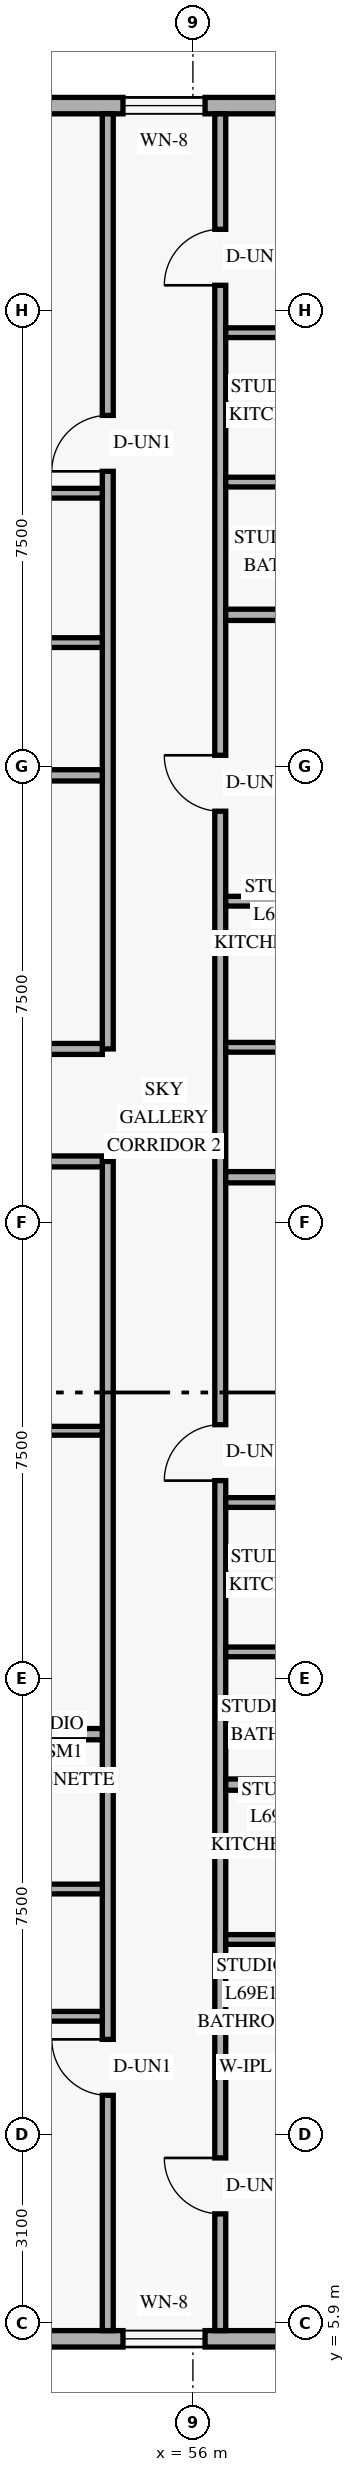
"""IFC4 building model, lengths in metres.
Left out: names, types, materials, properties, quantities, classifications, styles, units other than length and angle.
Written with IfcOpenShell. Run it as: python <this file> out.ifc"""

import sys

from ifc_helpers import new_model, si_unit, direction, frame, frame_2d, origin, place, context, subcontext, project, spatial, rectangle, extrude, element, fill, save


model = new_model("IFC4")
c1 = context("Model", 3, precision=1e-05, world=origin(), true_north=direction((0.0, 1.0)))
c2 = subcontext(c1, "Body", "Model", "MODEL_VIEW")
j1 = project(units=[si_unit("LENGTHUNIT", "METRE"), si_unit("PLANEANGLEUNIT", "RADIAN")], contexts=[c1])
p1 = place(None, origin())
s1 = spatial("IfcSite", under=j1, at=p1, CompositionType="ELEMENT")
p2 = place(p1, origin())
s2 = spatial("IfcBuilding", under=s1, at=p2, CompositionType="ELEMENT")
p3 = place(p2, frame((0.0, 0.0, 264.0)))
s3 = spatial("IfcBuildingStorey", under=s2, at=p3, CompositionType="ELEMENT", Elevation=264.0)
p4 = place(p3, frame((25.82, 5.635, 0.0), z_axis=(0.0, 0.0, 1.0), x_axis=(1.0, 0.0, 0.0)))
e1 = element("IfcWall", 1, at=p4, inside=s3, PredefinedType="SOLIDWALL", context=c2, shape_type="SweptSolid", body=[
    extrude(rectangle(XDim=32.96, YDim=0.27, at=frame_2d((16.48, 0.0))), origin(), (0.0, 0.0, 1.0), 3.36),
])
p5 = place(p4, frame((14.363, 0.0, 0.85)))
e2 = element("IfcOpeningElement", 2, at=p5, cuts=e1, PredefinedType="OPENING", context=c2, shape_type="SweptSolid", body=[
    extrude(rectangle(XDim=1.35, YDim=1.55, at=frame_2d((0.675, 0.775))), frame((0.0, 0.145, 0.0), z_axis=(0.0, -1.0, 0.0), x_axis=(1.0, 0.0, 0.0)), (0.0, 0.0, 1.0), 0.29),
])
p6 = place(p4, frame((25.645, 0.0, 0.85)))
e3 = element("IfcOpeningElement", 3, at=p6, cuts=e1, PredefinedType="OPENING", context=c2, shape_type="SweptSolid", body=[
    extrude(rectangle(XDim=1.35, YDim=1.55, at=frame_2d((0.675, 0.775))), frame((0.0, 0.145, 0.0), z_axis=(0.0, -1.0, 0.0), x_axis=(1.0, 0.0, 0.0)), (0.0, 0.0, 1.0), 0.29),
])
p7 = place(p4, frame((29.03, 0.0, 0.85)))
e4 = element("IfcOpeningElement", 4, at=p7, cuts=e1, PredefinedType="OPENING", context=c2, shape_type="SweptSolid", body=[
    extrude(rectangle(XDim=1.35, YDim=1.55, at=frame_2d((0.675, 0.775))), frame((0.0, 0.145, 0.0), z_axis=(0.0, -1.0, 0.0), x_axis=(1.0, 0.0, 0.0)), (0.0, 0.0, 1.0), 0.29),
])
p8 = place(p3, frame((58.78, 42.365, 0.0), z_axis=(0.0, 0.0, 1.0), x_axis=(-1.0, 0.0, 0.0)))
e5 = element("IfcWall", 5, at=p8, inside=s3, PredefinedType="SOLIDWALL", context=c2, shape_type="SweptSolid", body=[
    extrude(rectangle(XDim=32.96, YDim=0.27, at=frame_2d((16.48, 0.0))), origin(), (0.0, 0.0, 1.0), 3.36),
])
p9 = place(p8, frame((27.815, 0.0, 0.85)))
e6 = element("IfcOpeningElement", 6, at=p9, cuts=e5, PredefinedType="OPENING", context=c2, shape_type="SweptSolid", body=[
    extrude(rectangle(XDim=1.35, YDim=1.55, at=frame_2d((0.675, 0.775))), frame((0.0, 0.145, 0.0), z_axis=(0.0, -1.0, 0.0), x_axis=(1.0, 0.0, 0.0)), (0.0, 0.0, 1.0), 0.29),
])
p10 = place(p8, frame((14.656, 0.0, 0.85)))
e7 = element("IfcOpeningElement", 7, at=p10, cuts=e5, PredefinedType="OPENING", context=c2, shape_type="SweptSolid", body=[
    extrude(rectangle(XDim=1.35, YDim=1.55, at=frame_2d((0.675, 0.775))), frame((0.0, 0.145, 0.0), z_axis=(0.0, -1.0, 0.0), x_axis=(1.0, 0.0, 0.0)), (0.0, 0.0, 1.0), 0.29),
])
p11 = place(p8, frame((2.58, 0.0, 0.85)))
e8 = element("IfcOpeningElement", 8, at=p11, cuts=e5, PredefinedType="OPENING", context=c2, shape_type="SweptSolid", body=[
    extrude(rectangle(XDim=1.35, YDim=1.55, at=frame_2d((0.675, 0.775))), frame((0.0, 0.145, 0.0), z_axis=(0.0, -1.0, 0.0), x_axis=(1.0, 0.0, 0.0)), (0.0, 0.0, 1.0), 0.29),
])
p12 = place(p3, frame((54.6, 5.77, 0.0), z_axis=(0.0, 0.0, 1.0), x_axis=(0.0, 1.0, 0.0)))
e9 = element("IfcWall", 9, at=p12, inside=s3, PredefinedType="STANDARD", context=c2, shape_type="SweptSolid", body=[
    extrude(rectangle(XDim=19.23, YDim=0.18, at=frame_2d((9.615, 0.0))), origin(), (0.0, 0.0, 1.0), 2.803),
])
p13 = place(p12, frame((3.87, 0.0, 0.0)))
e10 = element("IfcOpeningElement", 10, at=p13, cuts=e9, PredefinedType="OPENING", context=c2, shape_type="SweptSolid", body=[
    extrude(rectangle(XDim=0.92, YDim=2.15, at=frame_2d((0.46, 1.075))), frame((0.0, 0.1, 0.0), z_axis=(0.0, -1.0, 0.0), x_axis=(1.0, 0.0, 0.0)), (0.0, 0.0, 1.0), 0.2),
])
p14 = place(p3, frame((54.6, 26.85, 0.0), z_axis=(0.0, 0.0, 1.0), x_axis=(0.0, 1.0, 0.0)))
e11 = element("IfcWall", 11, at=p14, inside=s3, PredefinedType="STANDARD", context=c2, shape_type="SweptSolid", body=[
    extrude(rectangle(XDim=15.38, YDim=0.18, at=frame_2d((7.69, 0.0))), origin(), (0.0, 0.0, 1.0), 2.803),
])
p15 = place(p14, frame((9.5, 0.0, 0.0)))
e12 = element("IfcOpeningElement", 12, at=p15, cuts=e11, PredefinedType="OPENING", context=c2, shape_type="SweptSolid", body=[
    extrude(rectangle(XDim=0.92, YDim=2.15, at=frame_2d((0.46, 1.075))), frame((0.0, 0.1, 0.0), z_axis=(0.0, -1.0, 0.0), x_axis=(1.0, 0.0, 0.0)), (0.0, 0.0, 1.0), 0.2),
])
p16 = place(p3, frame((37.64, 25.0, 0.0), z_axis=(0.0, 0.0, 1.0), x_axis=(1.0, 0.0, 0.0)))
e13 = element("IfcWall", 13, at=p16, inside=s3, PredefinedType="STANDARD", context=c2, shape_type="SweptSolid", body=[
    extrude(rectangle(XDim=16.87, YDim=0.18, at=frame_2d((8.435, 0.0))), origin(), (0.0, 0.0, 1.0), 2.803),
])
p17 = place(p16, frame((0.32, 0.0, 0.0)))
e14 = element("IfcOpeningElement", 14, at=p17, cuts=e13, PredefinedType="OPENING", context=c2, shape_type="SweptSolid", body=[
    extrude(rectangle(XDim=0.92, YDim=2.15, at=frame_2d((0.46, 1.075))), frame((0.0, 0.1, 0.0), z_axis=(0.0, -1.0, 0.0), x_axis=(1.0, 0.0, 0.0)), (0.0, 0.0, 1.0), 0.2),
])
p18 = place(p3, frame((37.64, 26.85, 0.0), z_axis=(0.0, 0.0, 1.0), x_axis=(1.0, 0.0, 0.0)))
e15 = element("IfcWall", 15, at=p18, inside=s3, PredefinedType="STANDARD", context=c2, shape_type="SweptSolid", body=[
    extrude(rectangle(XDim=16.87, YDim=0.18, at=frame_2d((8.435, 0.0))), origin(), (0.0, 0.0, 1.0), 2.803),
])
p19 = place(p18, frame((7.975, 0.0, 0.0)))
e16 = element("IfcOpeningElement", 16, at=p19, cuts=e15, PredefinedType="OPENING", context=c2, shape_type="SweptSolid", body=[
    extrude(rectangle(XDim=0.92, YDim=2.15, at=frame_2d((0.46, 1.075))), frame((0.0, 0.1, 0.0), z_axis=(0.0, -1.0, 0.0), x_axis=(1.0, 0.0, 0.0)), (0.0, 0.0, 1.0), 0.2),
])
p20 = place(p3, frame((56.45, 5.77, 0.0), z_axis=(0.0, 0.0, 1.0), x_axis=(0.0, 1.0, 0.0)))
e17 = element("IfcWall", 17, at=p20, inside=s3, PredefinedType="STANDARD", context=c2, shape_type="SweptSolid", body=[
    extrude(rectangle(XDim=36.46, YDim=0.18, at=frame_2d((18.23, 0.0))), origin(), (0.0, 0.0, 1.0), 2.803),
])
p21 = place(p20, frame((1.92, 0.0, 0.0)))
e18 = element("IfcOpeningElement", 18, at=p21, cuts=e17, PredefinedType="OPENING", context=c2, shape_type="SweptSolid", body=[
    extrude(rectangle(XDim=0.92, YDim=2.15, at=frame_2d((0.46, 1.075))), frame((0.0, 0.1, 0.0), z_axis=(0.0, -1.0, 0.0), x_axis=(1.0, 0.0, 0.0)), (0.0, 0.0, 1.0), 0.2),
])
p22 = place(p20, frame((13.98, 0.0, 0.0)))
e19 = element("IfcOpeningElement", 19, at=p22, cuts=e17, PredefinedType="OPENING", context=c2, shape_type="SweptSolid", body=[
    extrude(rectangle(XDim=0.92, YDim=2.15, at=frame_2d((0.46, 1.075))), frame((0.0, 0.1, 0.0), z_axis=(0.0, -1.0, 0.0), x_axis=(1.0, 0.0, 0.0)), (0.0, 0.0, 1.0), 0.2),
])
p23 = place(p20, frame((24.99, 0.0, 0.0)))
e20 = element("IfcOpeningElement", 20, at=p23, cuts=e17, PredefinedType="OPENING", context=c2, shape_type="SweptSolid", body=[
    extrude(rectangle(XDim=0.92, YDim=2.15, at=frame_2d((0.46, 1.075))), frame((0.0, 0.1, 0.0), z_axis=(0.0, -1.0, 0.0), x_axis=(1.0, 0.0, 0.0)), (0.0, 0.0, 1.0), 0.2),
])
p24 = place(p20, frame((33.64, 0.0, 0.0)))
e21 = element("IfcOpeningElement", 21, at=p24, cuts=e17, PredefinedType="OPENING", context=c2, shape_type="SweptSolid", body=[
    extrude(rectangle(XDim=0.92, YDim=2.15, at=frame_2d((0.46, 1.075))), frame((0.0, 0.1, 0.0), z_axis=(0.0, -1.0, 0.0), x_axis=(1.0, 0.0, 0.0)), (0.0, 0.0, 1.0), 0.2),
])
p25 = place(p3, frame((56.54, 10.11, 0.0), z_axis=(0.0, 0.0, 1.0), x_axis=(1.0, 0.0, 0.0)))
e22 = element("IfcWall", 22, at=p25, inside=s3, PredefinedType="PLUMBINGWALL", context=c2, shape_type="SweptSolid", body=[
    extrude(rectangle(XDim=2.606, YDim=0.16, at=frame_2d((1.303, 0.0))), origin(), (0.0, 0.0, 1.0), 2.879),
])
p26 = place(p3, frame((56.54, 12.203, 0.0), z_axis=(0.0, 0.0, 1.0), x_axis=(1.0, 0.0, 0.0)))
e23 = element("IfcWall", 23, at=p26, inside=s3, PredefinedType="PLUMBINGWALL", context=c2, shape_type="SweptSolid", body=[
    extrude(rectangle(XDim=2.446, YDim=0.16, at=frame_2d((1.223, 0.0))), origin(), (0.0, 0.0, 1.0), 2.879),
])
p27 = place(p3, frame((56.54, 14.75, 0.0), z_axis=(0.0, 0.0, 1.0), x_axis=(1.0, 0.0, 0.0)))
e24 = element("IfcWall", 24, at=p27, inside=s3, PredefinedType="PARTITIONING", context=c2, shape_type="SweptSolid", body=[
    extrude(rectangle(XDim=5.59, YDim=0.185, at=frame_2d((2.795, 0.0))), origin(), (0.0, 0.0, 1.0), 2.879),
])
p28 = place(p3, frame((56.54, 19.39, 0.0), z_axis=(0.0, 0.0, 1.0), x_axis=(1.0, 0.0, 0.0)))
e25 = element("IfcWall", 25, at=p28, inside=s3, PredefinedType="PLUMBINGWALL", context=c2, shape_type="SweptSolid", body=[
    extrude(rectangle(XDim=3.62, YDim=0.16, at=frame_2d((1.81, 0.0))), origin(), (0.0, 0.0, 1.0), 2.879),
])
p29 = place(p3, frame((56.54, 16.933, 0.0), z_axis=(0.0, 0.0, 1.0), x_axis=(1.0, 0.0, 0.0)))
e26 = element("IfcWall", 26, at=p29, inside=s3, PredefinedType="PLUMBINGWALL", context=c2, shape_type="SweptSolid", body=[
    extrude(rectangle(XDim=3.46, YDim=0.16, at=frame_2d((1.73, 0.0))), origin(), (0.0, 0.0, 1.0), 2.879),
])
p30 = place(p3, frame((56.54, 24.74, 0.0), z_axis=(0.0, 0.0, 1.0), x_axis=(1.0, 0.0, 0.0)))
e27 = element("IfcWall", 27, at=p30, inside=s3, PredefinedType="PARTITIONING", context=c2, shape_type="SweptSolid", body=[
    extrude(rectangle(XDim=5.59, YDim=0.185, at=frame_2d((2.795, 0.0))), origin(), (0.0, 0.0, 1.0), 2.879),
])
p31 = place(p3, frame((56.54, 29.28, 0.0), z_axis=(0.0, 0.0, 1.0), x_axis=(1.0, 0.0, 0.0)))
e28 = element("IfcWall", 28, at=p31, inside=s3, PredefinedType="PLUMBINGWALL", context=c2, shape_type="SweptSolid", body=[
    extrude(rectangle(XDim=2.758, YDim=0.16, at=frame_2d((1.379, 0.0))), origin(), (0.0, 0.0, 1.0), 2.879),
])
p32 = place(p3, frame((56.54, 26.877, 0.0), z_axis=(0.0, 0.0, 1.0), x_axis=(1.0, 0.0, 0.0)))
e29 = element("IfcWall", 29, at=p32, inside=s3, PredefinedType="PLUMBINGWALL", context=c2, shape_type="SweptSolid", body=[
    extrude(rectangle(XDim=2.598, YDim=0.16, at=frame_2d((1.299, 0.0))), origin(), (0.0, 0.0, 1.0), 2.879),
])
p33 = place(p3, frame((56.54, 33.99, 0.0), z_axis=(0.0, 0.0, 1.0), x_axis=(1.0, 0.0, 0.0)))
e30 = element("IfcWall", 30, at=p33, inside=s3, PredefinedType="PARTITIONING", context=c2, shape_type="SweptSolid", body=[
    extrude(rectangle(XDim=5.59, YDim=0.185, at=frame_2d((2.795, 0.0))), origin(), (0.0, 0.0, 1.0), 2.879),
])
p34 = place(p3, frame((56.54, 38.63, 0.0), z_axis=(0.0, 0.0, 1.0), x_axis=(1.0, 0.0, 0.0)))
e31 = element("IfcWall", 31, at=p34, inside=s3, PredefinedType="PLUMBINGWALL", context=c2, shape_type="SweptSolid", body=[
    extrude(rectangle(XDim=3.62, YDim=0.16, at=frame_2d((1.81, 0.0))), origin(), (0.0, 0.0, 1.0), 2.803),
])
p35 = place(p3, frame((56.54, 36.173, 0.0), z_axis=(0.0, 0.0, 1.0), x_axis=(1.0, 0.0, 0.0)))
e32 = element("IfcWall", 32, at=p35, inside=s3, PredefinedType="PLUMBINGWALL", context=c2, shape_type="SweptSolid", body=[
    extrude(rectangle(XDim=3.46, YDim=0.16, at=frame_2d((1.73, 0.0))), origin(), (0.0, 0.0, 1.0), 2.879),
])
p36 = place(p3, frame((37.64, 15.58, 0.0), z_axis=(0.0, 0.0, 1.0), x_axis=(1.0, 0.0, 0.0)))
e33 = element("IfcWall", 33, at=p36, inside=s3, PredefinedType="PARTITIONING", context=c2, shape_type="SweptSolid", body=[
    extrude(rectangle(XDim=16.87, YDim=0.185, at=frame_2d((8.435, 0.0))), origin(), (0.0, 0.0, 1.0), 2.803),
])
p37 = place(p3, frame((51.98, 10.94, 0.0), z_axis=(0.0, 0.0, 1.0), x_axis=(1.0, 0.0, 0.0)))
e34 = element("IfcWall", 34, at=p37, inside=s3, PredefinedType="PLUMBINGWALL", context=c2, shape_type="SweptSolid", body=[
    extrude(rectangle(XDim=2.53, YDim=0.16, at=frame_2d((1.265, 0.0))), origin(), (0.0, 0.0, 1.0), 3.36),
])
p38 = place(p3, frame((52.14, 13.033, 0.0), z_axis=(0.0, 0.0, 1.0), x_axis=(1.0, 0.0, 0.0)))
e35 = element("IfcWall", 35, at=p38, inside=s3, PredefinedType="PLUMBINGWALL", context=c2, shape_type="SweptSolid", body=[
    extrude(rectangle(XDim=2.37, YDim=0.16, at=frame_2d((1.185, 0.0))), origin(), (0.0, 0.0, 1.0), 3.36),
])
p39 = place(p3, frame((51.29, 20.57, 0.0), z_axis=(0.0, 0.0, 1.0), x_axis=(1.0, 0.0, 0.0)))
e36 = element("IfcWall", 36, at=p39, inside=s3, PredefinedType="PARTITIONING", context=c2, shape_type="SweptSolid", body=[
    extrude(rectangle(XDim=3.22, YDim=0.145, at=frame_2d((1.61, 0.0))), origin(), (0.0, 0.0, 1.0), 3.36),
])
p40 = place(p3, frame((38.173, 31.35, 0.0), z_axis=(0.0, 0.0, 1.0), x_axis=(1.0, 0.0, 0.0)))
e37 = element("IfcWall", 37, at=p40, inside=s3, PredefinedType="PARTITIONING", context=c2, shape_type="SweptSolid", body=[
    extrude(rectangle(XDim=16.337, YDim=0.185, at=frame_2d((8.169, 0.0))), origin(), (0.0, 0.0, 1.0), 2.803),
])
p41 = place(p3, frame((51.904, 35.99, 0.0), z_axis=(0.0, 0.0, 1.0), x_axis=(1.0, 0.0, 0.0)))
e38 = element("IfcWall", 38, at=p41, inside=s3, PredefinedType="PLUMBINGWALL", context=c2, shape_type="SweptSolid", body=[
    extrude(rectangle(XDim=2.606, YDim=0.16, at=frame_2d((1.303, 0.0))), origin(), (0.0, 0.0, 1.0), 3.36),
])
p42 = place(p3, frame((52.064, 33.533, 0.0), z_axis=(0.0, 0.0, 1.0), x_axis=(1.0, 0.0, 0.0)))
e39 = element("IfcWall", 39, at=p42, inside=s3, PredefinedType="PLUMBINGWALL", context=c2, shape_type="SweptSolid", body=[
    extrude(rectangle(XDim=2.446, YDim=0.16, at=frame_2d((1.223, 0.0))), origin(), (0.0, 0.0, 1.0), 3.36),
])
p43 = place(p7, origin())
e40 = element("IfcWindow", 40, at=p43, inside=s3, PartitioningType="SINGLE_PANEL", PredefinedType="WINDOW", context=c2, shape_type="SweptSolid", body=[
    extrude(rectangle(XDim=1.35, YDim=1.55, at=frame_2d((0.675, 0.775))), frame((0.0, 0.03, 0.0), z_axis=(0.0, -1.0, 0.0), x_axis=(1.0, 0.0, 0.0)), (0.0, 0.0, 1.0), 0.06),
])
fill(e4, e40)
p44 = place(p11, origin())
e41 = element("IfcWindow", 41, at=p44, inside=s3, PartitioningType="SINGLE_PANEL", PredefinedType="WINDOW", context=c2, shape_type="SweptSolid", body=[
    extrude(rectangle(XDim=1.35, YDim=1.55, at=frame_2d((0.675, 0.775))), frame((0.0, 0.03, 0.0), z_axis=(0.0, -1.0, 0.0), x_axis=(1.0, 0.0, 0.0)), (0.0, 0.0, 1.0), 0.06),
])
fill(e8, e41)
p45 = place(p21, origin())
e42 = element("IfcDoor", 42, at=p45, inside=s3, OperationType="SINGLE_SWING_RIGHT", PredefinedType="DOOR", context=c2, shape_type="SweptSolid", body=[
    extrude(rectangle(XDim=0.92, YDim=2.15, at=frame_2d((0.46, 1.075))), frame((0.0, 0.025, 0.0), z_axis=(0.0, -1.0, 0.0), x_axis=(1.0, 0.0, 0.0)), (0.0, 0.0, 1.0), 0.05),
])
fill(e18, e42)
p46 = place(p22, origin())
e43 = element("IfcDoor", 43, at=p46, inside=s3, OperationType="SINGLE_SWING_LEFT", PredefinedType="DOOR", context=c2, shape_type="SweptSolid", body=[
    extrude(rectangle(XDim=0.92, YDim=2.15, at=frame_2d((0.46, 1.075))), frame((0.0, 0.025, 0.0), z_axis=(0.0, -1.0, 0.0), x_axis=(1.0, 0.0, 0.0)), (0.0, 0.0, 1.0), 0.05),
])
fill(e19, e43)
p47 = place(p23, origin())
e44 = element("IfcDoor", 44, at=p47, inside=s3, OperationType="SINGLE_SWING_RIGHT", PredefinedType="DOOR", context=c2, shape_type="SweptSolid", body=[
    extrude(rectangle(XDim=0.92, YDim=2.15, at=frame_2d((0.46, 1.075))), frame((0.0, 0.025, 0.0), z_axis=(0.0, -1.0, 0.0), x_axis=(1.0, 0.0, 0.0)), (0.0, 0.0, 1.0), 0.05),
])
fill(e20, e44)
p48 = place(p24, origin())
e45 = element("IfcDoor", 45, at=p48, inside=s3, OperationType="SINGLE_SWING_LEFT", PredefinedType="DOOR", context=c2, shape_type="SweptSolid", body=[
    extrude(rectangle(XDim=0.92, YDim=2.15, at=frame_2d((0.46, 1.075))), frame((0.0, 0.025, 0.0), z_axis=(0.0, -1.0, 0.0), x_axis=(1.0, 0.0, 0.0)), (0.0, 0.0, 1.0), 0.05),
])
fill(e21, e45)
p49 = place(p13, origin())
e46 = element("IfcDoor", 46, at=p49, inside=s3, OperationType="SINGLE_SWING_RIGHT", PredefinedType="DOOR", context=c2, shape_type="SweptSolid", body=[
    extrude(rectangle(XDim=0.92, YDim=2.15, at=frame_2d((0.46, 1.075))), frame((0.0, 0.025, 0.0), z_axis=(0.0, -1.0, 0.0), x_axis=(1.0, 0.0, 0.0)), (0.0, 0.0, 1.0), 0.05),
])
fill(e10, e46)
p50 = place(p15, origin())
e47 = element("IfcDoor", 47, at=p50, inside=s3, OperationType="SINGLE_SWING_LEFT", PredefinedType="DOOR", context=c2, shape_type="SweptSolid", body=[
    extrude(rectangle(XDim=0.92, YDim=2.15, at=frame_2d((0.46, 1.075))), frame((0.0, 0.025, 0.0), z_axis=(0.0, -1.0, 0.0), x_axis=(1.0, 0.0, 0.0)), (0.0, 0.0, 1.0), 0.05),
])
fill(e12, e47)
save(model, sys.argv[1])
